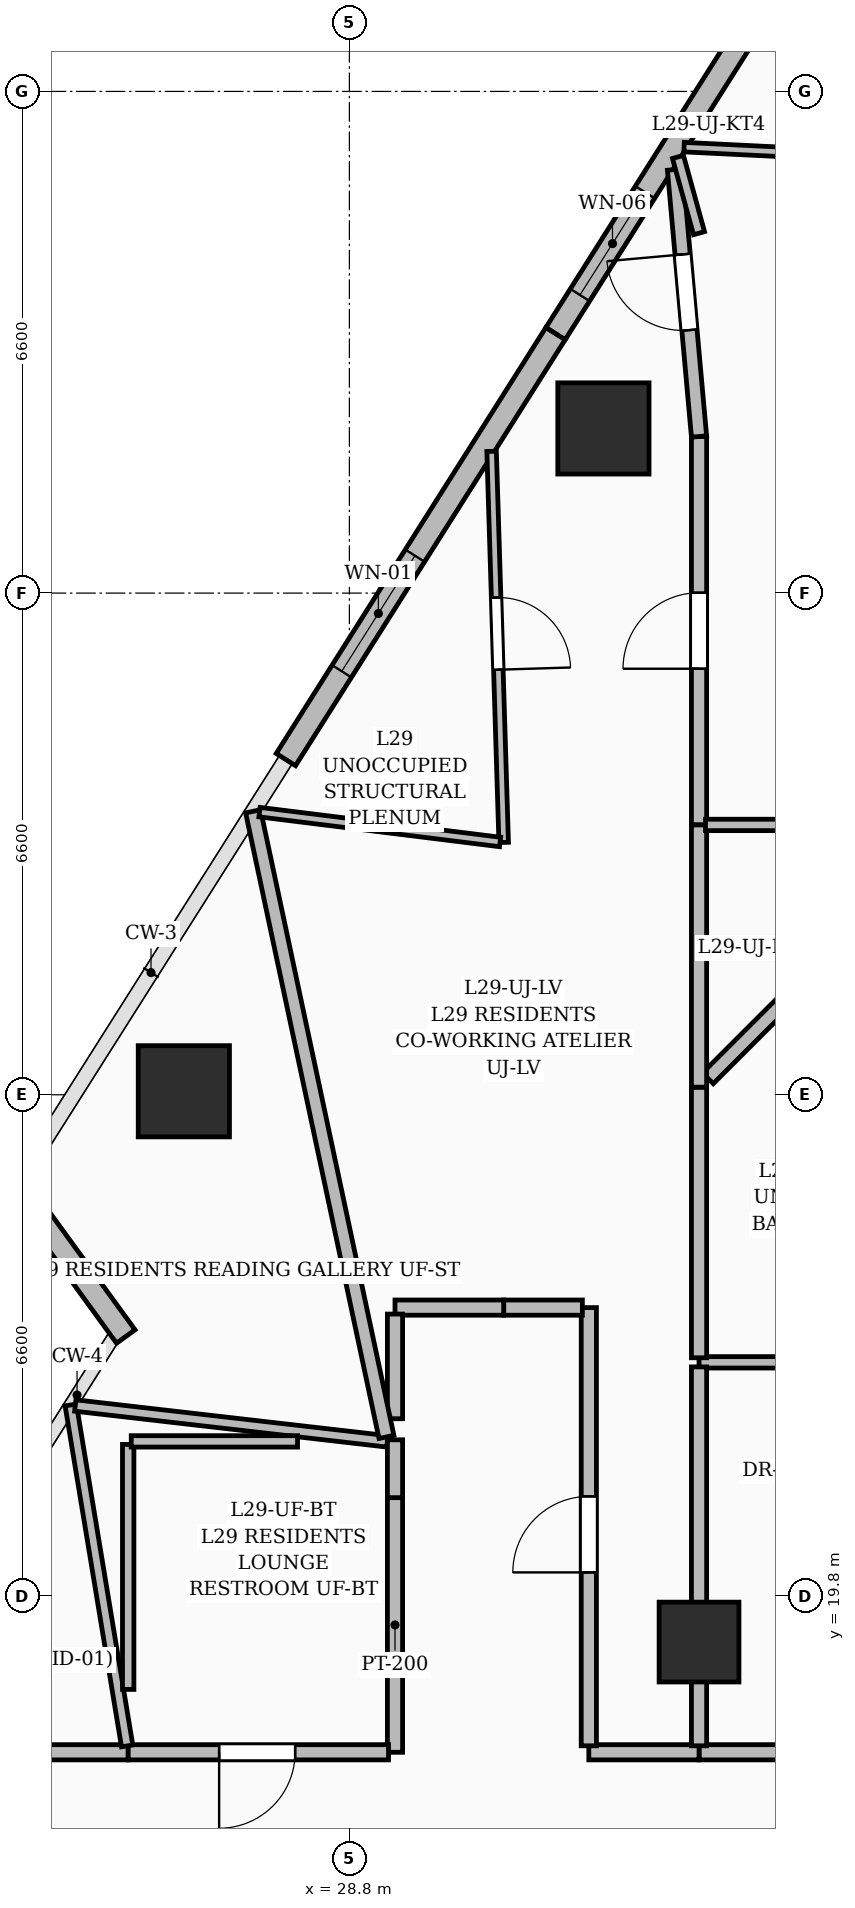
"""IFC4 building model, lengths in metres.
Left out: names, types, materials, properties, quantities, classifications, styles, units other than length and angle.
Written with IfcOpenShell. Run it as: python <this file> out.ifc"""

import sys

from ifc_helpers import new_model, si_unit, direction, frame, frame_2d, origin, origin_2d, place, context, subcontext, project, spatial, rectangle, extrude, element, fill, save


model = new_model("IFC4")
c1 = context("Model", 3, precision=1e-05, world=origin(), true_north=direction((0.0, 1.0)))
c2 = subcontext(c1, "Body", "Model", "MODEL_VIEW")
j1 = project(units=[si_unit("LENGTHUNIT", "METRE"), si_unit("PLANEANGLEUNIT", "RADIAN")], contexts=[c1])
p1 = place(None, origin())
s1 = spatial("IfcSite", under=j1, at=p1, CompositionType="ELEMENT")
p2 = place(p1, origin())
s2 = spatial("IfcBuilding", under=s1, at=p2, CompositionType="ELEMENT")
p3 = place(p2, frame((0.0, 0.0, 117.6)))
s3 = spatial("IfcBuildingStorey", under=s2, at=p3, CompositionType="ELEMENT", Elevation=117.6)
p4 = place(p3, frame((33.4, 19.2, 0.0), z_axis=(0.0, 0.0, 1.0), x_axis=(1.0, 0.0, 0.0)))
e1 = element("IfcColumn", 1, at=p4, inside=s3, PredefinedType="COLUMN", context=c2, shape_type="SweptSolid", body=[
    extrude(rectangle(XDim=1.05, YDim=1.05, at=origin_2d()), origin(), (0.0, 0.0, 1.0), 3.6),
])
for number, where, z_axis, x_axis in (
    (2, (32.142, 35.166, 0.0), (0.0, 0.0, 1.0), (1.0, 0.0, 0.0)),
    (3, (26.622, 26.446, 0.0), (0.0, 0.0, 1.0), (1.0, 0.0, 0.0)),
):
    element("IfcColumn", number, at=place(p3, frame(where, z_axis=z_axis, x_axis=x_axis)), inside=s3, PredefinedType="COLUMN", context=c2, shape_type="SweptSolid", body=[
        extrude(rectangle(XDim=1.2, YDim=1.2, at=origin_2d()), origin(), (0.0, 0.0, 1.0), 3.6),
    ])
p5 = place(p3, frame((25.858, 23.22, 0.0), z_axis=(0.0, 0.0, 1.0), x_axis=(-0.587763102288, 0.809033086832, 0.0)))
e4 = element("IfcWall", 4, at=p5, inside=s3, PredefinedType="SOLIDWALL", context=c2, shape_type="SweptSolid", body=[
    extrude(rectangle(XDim=2.594, YDim=0.3, at=frame_2d((1.297, 0.0))), origin(), (0.0, 0.0, 1.0), 2.575),
])
p6 = place(p3, frame((27.964, 30.81, 0.0), z_axis=(0.0, 0.0, 1.0), x_axis=(0.534892719091, 0.844919983823, 0.0)))
e5 = element("IfcWall", 5, at=p6, inside=s3, PredefinedType="SOLIDWALL", context=c2, shape_type="SweptSolid", body=[
    extrude(rectangle(XDim=6.634, YDim=0.3, at=frame_2d((3.317, 0.0))), origin(), (0.0, 0.0, 1.0), 3.35),
])
p7 = place(p6, frame((1.375, 0.0, 0.6)))
e6 = element("IfcOpeningElement", 6, at=p7, cuts=e5, PredefinedType="OPENING", context=c2, shape_type="SweptSolid", body=[
    extrude(rectangle(XDim=1.8, YDim=2.1, at=frame_2d((0.9, 1.05))), frame((0.0, 0.16, 0.0), z_axis=(0.0, -1.0, 0.0), x_axis=(1.0, 0.0, 0.0)), (0.0, 0.0, 1.0), 0.32),
])
p8 = place(p3, frame((31.513, 36.415, 0.0), z_axis=(0.0, 0.0, 1.0), x_axis=(0.534892719091, 0.844919983823, 0.0)))
e7 = element("IfcWall", 7, at=p8, inside=s3, PredefinedType="SOLIDWALL", context=c2, shape_type="SweptSolid", body=[
    extrude(rectangle(XDim=6.634, YDim=0.3, at=frame_2d((3.317, 0.0))), origin(), (0.0, 0.0, 1.0), 3.35),
])
p9 = place(p8, frame((0.6, 0.0, 0.55)))
e8 = element("IfcOpeningElement", 8, at=p9, cuts=e7, PredefinedType="OPENING", context=c2, shape_type="SweptSolid", body=[
    extrude(rectangle(XDim=1.6, YDim=2.2, at=frame_2d((0.8, 1.1))), frame((0.0, 0.16, 0.0), z_axis=(0.0, -1.0, 0.0), x_axis=(1.0, 0.0, 0.0)), (0.0, 0.0, 1.0), 0.32),
])
p10 = place(p3, frame((25.89, 17.75, 0.0), z_axis=(0.0, 0.0, 1.0), x_axis=(-1.0, 0.0, 0.0)))
e9 = element("IfcWall", 9, at=p10, inside=s3, PredefinedType="PARTITIONING", context=c2, shape_type="SweptSolid", body=[
    extrude(rectangle(XDim=4.49, YDim=0.2, at=frame_2d((2.245, 0.0))), origin(), (0.0, 0.0, 1.0), 2.372),
])
p11 = place(p10, frame((1.686, 0.0, 0.0)))
e10 = element("IfcOpeningElement", 10, at=p11, cuts=e9, PredefinedType="OPENING", context=c2, shape_type="SweptSolid", body=[
    extrude(rectangle(XDim=1.0, YDim=2.2, at=frame_2d((0.5, 1.1))), frame((0.0, 0.11, 0.0), z_axis=(0.0, -1.0, 0.0), x_axis=(1.0, 0.0, 0.0)), (0.0, 0.0, 1.0), 0.22),
])
p12 = place(p3, frame((29.4, 21.1, 0.0), z_axis=(0.0, 0.0, 1.0), x_axis=(0.0, -1.0, 0.0)))
e11 = element("IfcWall", 11, at=p12, inside=s3, PredefinedType="PARTITIONING", context=c2, shape_type="SweptSolid", body=[
    extrude(rectangle(XDim=3.35, YDim=0.2, at=frame_2d((1.675, 0.0))), origin(), (0.0, 0.0, 1.0), 2.771),
])
p13 = place(p3, frame((29.315, 17.75, 0.0), z_axis=(0.0, 0.0, 1.0), x_axis=(-1.0, 0.0, 0.0)))
e12 = element("IfcWall", 12, at=p13, inside=s3, PredefinedType="PARTITIONING", context=c2, shape_type="SweptSolid", body=[
    extrude(rectangle(XDim=3.425, YDim=0.2, at=frame_2d((1.712, 0.0))), origin(), (0.0, 0.0, 1.0), 2.771),
])
p14 = place(p13, frame((1.229, 0.0, 0.0)))
e13 = element("IfcOpeningElement", 13, at=p14, cuts=e12, PredefinedType="OPENING", context=c2, shape_type="SweptSolid", body=[
    extrude(rectangle(XDim=1.0, YDim=2.2, at=frame_2d((0.5, 1.1))), frame((0.0, 0.11, 0.0), z_axis=(0.0, -1.0, 0.0), x_axis=(1.0, 0.0, 0.0)), (0.0, 0.0, 1.0), 0.22),
])
p15 = place(p3, frame((36.4, 17.75, 0.0), z_axis=(0.0, 0.0, 1.0), x_axis=(-1.0, 0.0, 0.0)))
e14 = element("IfcWall", 14, at=p15, inside=s3, PredefinedType="PARTITIONING", context=c2, shape_type="SweptSolid", body=[
    extrude(rectangle(XDim=3.0, YDim=0.2, at=frame_2d((1.5, 0.0))), origin(), (0.0, 0.0, 1.0), 2.436),
])
p16 = place(p3, frame((33.4, 17.75, 0.0), z_axis=(0.0, 0.0, 1.0), x_axis=(-1.0, 0.0, 0.0)))
e15 = element("IfcWall", 15, at=p16, inside=s3, PredefinedType="PARTITIONING", context=c2, shape_type="SweptSolid", body=[
    extrude(rectangle(XDim=1.45, YDim=0.2, at=frame_2d((0.725, 0.0))), origin(), (0.0, 0.0, 1.0), 3.35),
])
p17 = place(p3, frame((31.95, 17.835, 0.0), z_axis=(0.0, 0.0, 1.0), x_axis=(0.0, 1.0, 0.0)))
e16 = element("IfcWall", 16, at=p17, inside=s3, PredefinedType="PARTITIONING", context=c2, shape_type="SweptSolid", body=[
    extrude(rectangle(XDim=5.765, YDim=0.2, at=frame_2d((2.883, 0.0))), origin(), (0.0, 0.0, 1.0), 2.372),
])
p18 = place(p17, frame((2.281, 0.0, 0.0)))
e17 = element("IfcOpeningElement", 17, at=p18, cuts=e16, PredefinedType="OPENING", context=c2, shape_type="SweptSolid", body=[
    extrude(rectangle(XDim=1.0, YDim=2.2, at=frame_2d((0.5, 1.1))), frame((0.0, 0.11, 0.0), z_axis=(0.0, -1.0, 0.0), x_axis=(1.0, 0.0, 0.0)), (0.0, 0.0, 1.0), 0.22),
])
p19 = place(p3, frame((31.865, 23.6, 0.0), z_axis=(0.0, 0.0, 1.0), x_axis=(-1.0, 0.0, 0.0)))
e18 = element("IfcWall", 18, at=p19, inside=s3, PredefinedType="PARTITIONING", context=c2, shape_type="SweptSolid", body=[
    extrude(rectangle(XDim=1.035, YDim=0.2, at=frame_2d((0.518, 0.0))), origin(), (0.0, 0.0, 1.0), 2.771),
])
p20 = place(p3, frame((30.83, 23.6, 0.0), z_axis=(0.0, 0.0, 1.0), x_axis=(-1.0, 0.0, 0.0)))
e19 = element("IfcWall", 19, at=p20, inside=s3, PredefinedType="PARTITIONING", context=c2, shape_type="SweptSolid", body=[
    extrude(rectangle(XDim=1.43, YDim=0.2, at=frame_2d((0.715, 0.0))), origin(), (0.0, 0.0, 1.0), 2.372),
])
p21 = place(p3, frame((29.4, 23.515, 0.0), z_axis=(0.0, 0.0, 1.0), x_axis=(0.0, -1.0, 0.0)))
e20 = element("IfcWall", 20, at=p21, inside=s3, PredefinedType="PARTITIONING", context=c2, shape_type="SweptSolid", body=[
    extrude(rectangle(XDim=1.377, YDim=0.2, at=frame_2d((0.688, 0.0))), origin(), (0.0, 0.0, 1.0), 2.372),
])
p22 = place(p3, frame((25.876, 17.834, 0.0), z_axis=(0.0, 0.0, 1.0), x_axis=(-0.163258044995, 0.986583402832, 0.0)))
e21 = element("IfcWall", 21, at=p22, inside=s3, PredefinedType="PARTITIONING", context=c2, shape_type="SweptSolid", body=[
    extrude(rectangle(XDim=4.546, YDim=0.15, at=frame_2d((2.273, 0.0))), origin(), (0.0, 0.0, 1.0), 2.771),
])
p23 = place(p3, frame((29.3, 21.84, 0.0), z_axis=(0.0, 0.0, 1.0), x_axis=(-0.993461085134, 0.114171241234, 0.0)))
e22 = element("IfcWall", 22, at=p23, inside=s3, PredefinedType="PARTITIONING", context=c2, shape_type="SweptSolid", body=[
    extrude(rectangle(XDim=4.134, YDim=0.15, at=frame_2d((2.067, 0.0))), origin(), (0.0, 0.0, 1.0), 2.771),
])
p24 = place(p3, frame((29.288, 21.899, 0.0), z_axis=(0.0, 0.0, 1.0), x_axis=(-0.208508604507, 0.978020532426, 0.0)))
e23 = element("IfcWall", 23, at=p24, inside=s3, PredefinedType="PARTITIONING", context=c2, shape_type="SweptSolid", body=[
    extrude(rectangle(XDim=8.415, YDim=0.2, at=frame_2d((4.208, 0.0))), origin(), (0.0, 0.0, 1.0), 2.372),
])
p25 = place(p3, frame((33.4, 22.88, 0.0), z_axis=(0.0, 0.0, 1.0), x_axis=(1.0, 0.0, 0.0)))
e24 = element("IfcWall", 24, at=p25, inside=s3, PredefinedType="PARTITIONING", context=c2, shape_type="SweptSolid", body=[
    extrude(rectangle(XDim=2.94, YDim=0.15, at=frame_2d((1.47, 0.0))), origin(), (0.0, 0.0, 1.0), 2.436),
])
p26 = place(p25, frame((1.075, 0.0, 0.0)))
e25 = element("IfcOpeningElement", 25, at=p26, cuts=e24, PredefinedType="OPENING", context=c2, shape_type="SweptSolid", body=[
    extrude(rectangle(XDim=0.85, YDim=2.1, at=frame_2d((0.425, 1.05))), frame((0.0, 0.085, 0.0), z_axis=(0.0, -1.0, 0.0), x_axis=(1.0, 0.0, 0.0)), (0.0, 0.0, 1.0), 0.17),
])
p27 = place(p3, frame((33.4, 26.5, 0.0), z_axis=(0.0, 0.0, 1.0), x_axis=(0.0, -1.0, 0.0)))
e26 = element("IfcWall", 26, at=p27, inside=s3, PredefinedType="PARTITIONING", context=c2, shape_type="SweptSolid", body=[
    extrude(rectangle(XDim=3.56, YDim=0.2, at=frame_2d((1.78, 0.0))), origin(), (0.0, 0.0, 1.0), 2.771),
])
p28 = place(p3, frame((36.358, 29.458, 0.0), z_axis=(0.0, 0.0, 1.0), x_axis=(-0.707137163672, -0.707076397395, 0.0)))
e27 = element("IfcWall", 27, at=p28, inside=s3, PredefinedType="PARTITIONING", context=c2, shape_type="SweptSolid", body=[
    extrude(rectangle(XDim=4.018, YDim=0.2, at=frame_2d((2.009, 0.0))), origin(), (0.0, 0.0, 1.0), 2.372),
])
p29 = place(p3, frame((33.4, 22.82, 0.0), z_axis=(0.0, 0.0, 1.0), x_axis=(0.0, -1.0, 0.0)))
e28 = element("IfcWall", 28, at=p29, inside=s3, PredefinedType="PARTITIONING", context=c2, shape_type="SweptSolid", body=[
    extrude(rectangle(XDim=4.985, YDim=0.2, at=frame_2d((2.493, 0.0))), origin(), (0.0, 0.0, 1.0), 2.436),
])
p30 = place(p3, frame((30.671, 34.865, 0.0), z_axis=(0.0, 0.0, 1.0), x_axis=(0.030923800782, -0.999521744909, 0.0)))
e29 = element("IfcWall", 29, at=p30, inside=s3, PredefinedType="PARTITIONING", context=c2, shape_type="SweptSolid", body=[
    extrude(rectangle(XDim=5.147, YDim=0.125, at=frame_2d((2.574, 0.0))), origin(), (0.0, 0.0, 1.0), 2.57),
])
p31 = place(p30, frame((1.924, 0.0, 0.0)))
e30 = element("IfcOpeningElement", 30, at=p31, cuts=e29, PredefinedType="OPENING", context=c2, shape_type="SweptSolid", body=[
    extrude(rectangle(XDim=0.95, YDim=2.2, at=frame_2d((0.475, 1.1))), frame((0.0, 0.072, 0.0), z_axis=(0.0, -1.0, 0.0), x_axis=(1.0, 0.0, 0.0)), (0.0, 0.0, 1.0), 0.145),
])
p32 = place(p3, frame((33.4, 29.95, 0.0), z_axis=(0.0, 0.0, 1.0), x_axis=(0.0, 1.0, 0.0)))
e31 = element("IfcWall", 31, at=p32, inside=s3, PredefinedType="PARTITIONING", context=c2, shape_type="SweptSolid", body=[
    extrude(rectangle(XDim=5.11, YDim=0.2, at=frame_2d((2.555, 0.0))), origin(), (0.0, 0.0, 1.0), 2.372),
])
p33 = place(p32, frame((2.055, 0.0, 0.0)))
e32 = element("IfcOpeningElement", 32, at=p33, cuts=e31, PredefinedType="OPENING", context=c2, shape_type="SweptSolid", body=[
    extrude(rectangle(XDim=1.0, YDim=2.2, at=frame_2d((0.5, 1.1))), frame((0.0, 0.11, 0.0), z_axis=(0.0, -1.0, 0.0), x_axis=(1.0, 0.0, 0.0)), (0.0, 0.0, 1.0), 0.22),
])
p34 = place(p3, frame((33.4, 26.5, 0.0), z_axis=(0.0, 0.0, 1.0), x_axis=(0.0, 1.0, 0.0)))
e33 = element("IfcWall", 33, at=p34, inside=s3, PredefinedType="PARTITIONING", context=c2, shape_type="SweptSolid", body=[
    extrude(rectangle(XDim=3.45, YDim=0.2, at=frame_2d((1.725, 0.0))), origin(), (0.0, 0.0, 1.0), 2.771),
])
p35 = place(p3, frame((33.4, 35.06, 0.0), z_axis=(0.0, 0.0, 1.0), x_axis=(-0.089730417275, 0.995966089892, 0.0)))
e34 = element("IfcWall", 34, at=p35, inside=s3, PredefinedType="PARTITIONING", context=c2, shape_type="SweptSolid", body=[
    extrude(rectangle(XDim=3.526, YDim=0.2, at=frame_2d((1.763, 0.0))), origin(), (0.0, 0.0, 1.0), 2.57),
])
p36 = place(p35, frame((1.406, 0.0, 0.0)))
e35 = element("IfcOpeningElement", 35, at=p36, cuts=e34, PredefinedType="OPENING", context=c2, shape_type="SweptSolid", body=[
    extrude(rectangle(XDim=1.0, YDim=2.2, at=frame_2d((0.5, 1.1))), frame((0.0, 0.11, 0.0), z_axis=(0.0, -1.0, 0.0), x_axis=(1.0, 0.0, 0.0)), (0.0, 0.0, 1.0), 0.22),
])
p37 = place(p3, frame((27.617, 30.118, 0.0), z_axis=(0.0, 0.0, 1.0), x_axis=(0.992397517991, -0.123073824536, 0.0)))
e36 = element("IfcWall", 36, at=p37, inside=s3, PredefinedType="PARTITIONING", context=c2, shape_type="SweptSolid", body=[
    extrude(rectangle(XDim=3.19, YDim=0.125, at=frame_2d((1.595, 0.0))), origin(), (0.0, 0.0, 1.0), 2.57),
])
p38 = place(p3, frame((33.485, 29.95, 0.0), z_axis=(0.0, 0.0, 1.0), x_axis=(1.0, 0.0, 0.0)))
e37 = element("IfcWall", 37, at=p38, inside=s3, PredefinedType="PARTITIONING", context=c2, shape_type="SweptSolid", body=[
    extrude(rectangle(XDim=3.28, YDim=0.15, at=frame_2d((1.64, 0.0))), origin(), (0.0, 0.0, 1.0), 2.372),
])
p39 = place(p38, frame((1.215, 0.0, 0.0)))
e38 = element("IfcOpeningElement", 38, at=p39, cuts=e37, PredefinedType="OPENING", context=c2, shape_type="SweptSolid", body=[
    extrude(rectangle(XDim=0.85, YDim=2.1, at=frame_2d((0.425, 1.05))), frame((0.0, 0.085, 0.0), z_axis=(0.0, -1.0, 0.0), x_axis=(1.0, 0.0, 0.0)), (0.0, 0.0, 1.0), 0.17),
])
p40 = place(p3, frame((37.85, 38.64, 0.0), z_axis=(0.0, 0.0, 1.0), x_axis=(-0.998808611293, 0.04879915989, 0.0)))
e39 = element("IfcWall", 39, at=p40, inside=s3, PredefinedType="PARTITIONING", context=c2, shape_type="SweptSolid", body=[
    extrude(rectangle(XDim=4.653, YDim=0.125, at=frame_2d((2.326, 0.0))), origin(), (0.0, 0.0, 1.0), 3.35),
])
p41 = place(p40, frame((1.923, 0.0, 0.0)))
e40 = element("IfcOpeningElement", 40, at=p41, cuts=e39, PredefinedType="OPENING", context=c2, shape_type="SweptSolid", body=[
    extrude(rectangle(XDim=0.95, YDim=2.2, at=frame_2d((0.475, 1.1))), frame((0.0, 0.072, 0.0), z_axis=(0.0, -1.0, 0.0), x_axis=(1.0, 0.0, 0.0)), (0.0, 0.0, 1.0), 0.145),
])
p42 = place(p3, frame((25.89, 18.577, 0.0), z_axis=(0.0, 0.0, 1.0), x_axis=(0.0, 1.0, 0.0)))
e41 = element("IfcWall", 41, at=p42, inside=s3, PredefinedType="PARTITIONING", context=c2, shape_type="SweptSolid", body=[
    extrude(rectangle(XDim=3.223, YDim=0.15, at=frame_2d((1.612, 0.0))), origin(), (0.0, 0.0, 1.0), 2.771),
])
p43 = place(p3, frame((25.93, 21.84, 0.0), z_axis=(0.0, 0.0, 1.0), x_axis=(1.0, 0.0, 0.0)))
e42 = element("IfcWall", 42, at=p43, inside=s3, PredefinedType="PARTITIONING", context=c2, shape_type="SweptSolid", body=[
    extrude(rectangle(XDim=2.188, YDim=0.15, at=frame_2d((1.094, 0.0))), origin(), (0.0, 0.0, 1.0), 2.771),
])
p44 = place(p3, frame((33.4, 37.735, 0.0), z_axis=(0.0, 0.0, 1.0), x_axis=(-0.266094416797, 0.963946970196, 0.0)))
e43 = element("IfcWall", 43, at=p44, inside=s3, PredefinedType="PARTITIONING", context=c2, shape_type="SweptSolid", body=[
    extrude(rectangle(XDim=1.041, YDim=0.15, at=frame_2d((0.52, 0.0))), origin(), (0.0, 0.0, 1.0), 3.35),
])
p45 = place(p3, frame((29.4, 21.861, 0.0), z_axis=(0.0, 0.0, 1.0), x_axis=(0.0, -1.0, 0.0)))
e44 = element("IfcWall", 44, at=p45, inside=s3, PredefinedType="PARTITIONING", context=c2, shape_type="SweptSolid", body=[
    extrude(rectangle(XDim=0.761, YDim=0.2, at=frame_2d((0.38, 0.0))), origin(), (0.0, 0.0, 1.0), 2.372),
])
p46 = place(p7, origin())
e45 = element("IfcWindow", 45, at=p46, inside=s3, PartitioningType="SINGLE_PANEL", PredefinedType="WINDOW", context=c2, shape_type="SweptSolid", body=[
    extrude(rectangle(XDim=1.8, YDim=2.1, at=frame_2d((0.9, 1.05))), frame((0.0, 0.03, 0.0), z_axis=(0.0, -1.0, 0.0), x_axis=(1.0, 0.0, 0.0)), (0.0, 0.0, 1.0), 0.06),
])
fill(e6, e45)
p47 = place(p9, origin())
e46 = element("IfcWindow", 46, at=p47, inside=s3, PartitioningType="SINGLE_PANEL", PredefinedType="WINDOW", context=c2, shape_type="SweptSolid", body=[
    extrude(rectangle(XDim=1.6, YDim=2.2, at=frame_2d((0.8, 1.1))), frame((0.0, 0.03, 0.0), z_axis=(0.0, -1.0, 0.0), x_axis=(1.0, 0.0, 0.0)), (0.0, 0.0, 1.0), 0.06),
])
fill(e8, e46)
p48 = place(p18, origin())
e47 = element("IfcDoor", 47, at=p48, inside=s3, OperationType="SINGLE_SWING_LEFT", PredefinedType="DOOR", context=c2, shape_type="SweptSolid", body=[
    extrude(rectangle(XDim=1.0, YDim=2.2, at=frame_2d((0.5, 1.1))), frame((0.0, 0.025, 0.0), z_axis=(0.0, -1.0, 0.0), x_axis=(1.0, 0.0, 0.0)), (0.0, 0.0, 1.0), 0.05),
])
fill(e17, e47)
p49 = place(p31, origin())
e48 = element("IfcDoor", 48, at=p49, inside=s3, OperationType="SINGLE_SWING_RIGHT", PredefinedType="DOOR", context=c2, shape_type="SweptSolid", body=[
    extrude(rectangle(XDim=0.95, YDim=2.2, at=frame_2d((0.475, 1.1))), frame((0.0, 0.025, 0.0), z_axis=(0.0, -1.0, 0.0), x_axis=(1.0, 0.0, 0.0)), (0.0, 0.0, 1.0), 0.05),
])
fill(e30, e48)
p50 = place(p33, origin())
e49 = element("IfcDoor", 49, at=p50, inside=s3, OperationType="SINGLE_SWING_LEFT", PredefinedType="DOOR", context=c2, shape_type="SweptSolid", body=[
    extrude(rectangle(XDim=1.0, YDim=2.2, at=frame_2d((0.5, 1.1))), frame((0.0, 0.025, 0.0), z_axis=(0.0, -1.0, 0.0), x_axis=(1.0, 0.0, 0.0)), (0.0, 0.0, 1.0), 0.05),
])
fill(e32, e49)
p51 = place(p36, origin())
e50 = element("IfcDoor", 50, at=p51, inside=s3, OperationType="SINGLE_SWING_RIGHT", PredefinedType="DOOR", context=c2, shape_type="SweptSolid", body=[
    extrude(rectangle(XDim=1.0, YDim=2.2, at=frame_2d((0.5, 1.1))), frame((0.0, 0.025, 0.0), z_axis=(0.0, -1.0, 0.0), x_axis=(1.0, 0.0, 0.0)), (0.0, 0.0, 1.0), 0.05),
])
fill(e35, e50)
p52 = place(p14, origin())
e51 = element("IfcDoor", 51, at=p52, inside=s3, OperationType="SINGLE_SWING_RIGHT", PredefinedType="DOOR", context=c2, shape_type="SweptSolid", body=[
    extrude(rectangle(XDim=1.0, YDim=2.2, at=frame_2d((0.5, 1.1))), frame((0.0, 0.025, 0.0), z_axis=(0.0, -1.0, 0.0), x_axis=(1.0, 0.0, 0.0)), (0.0, 0.0, 1.0), 0.05),
])
fill(e13, e51)
save(model, sys.argv[1])
